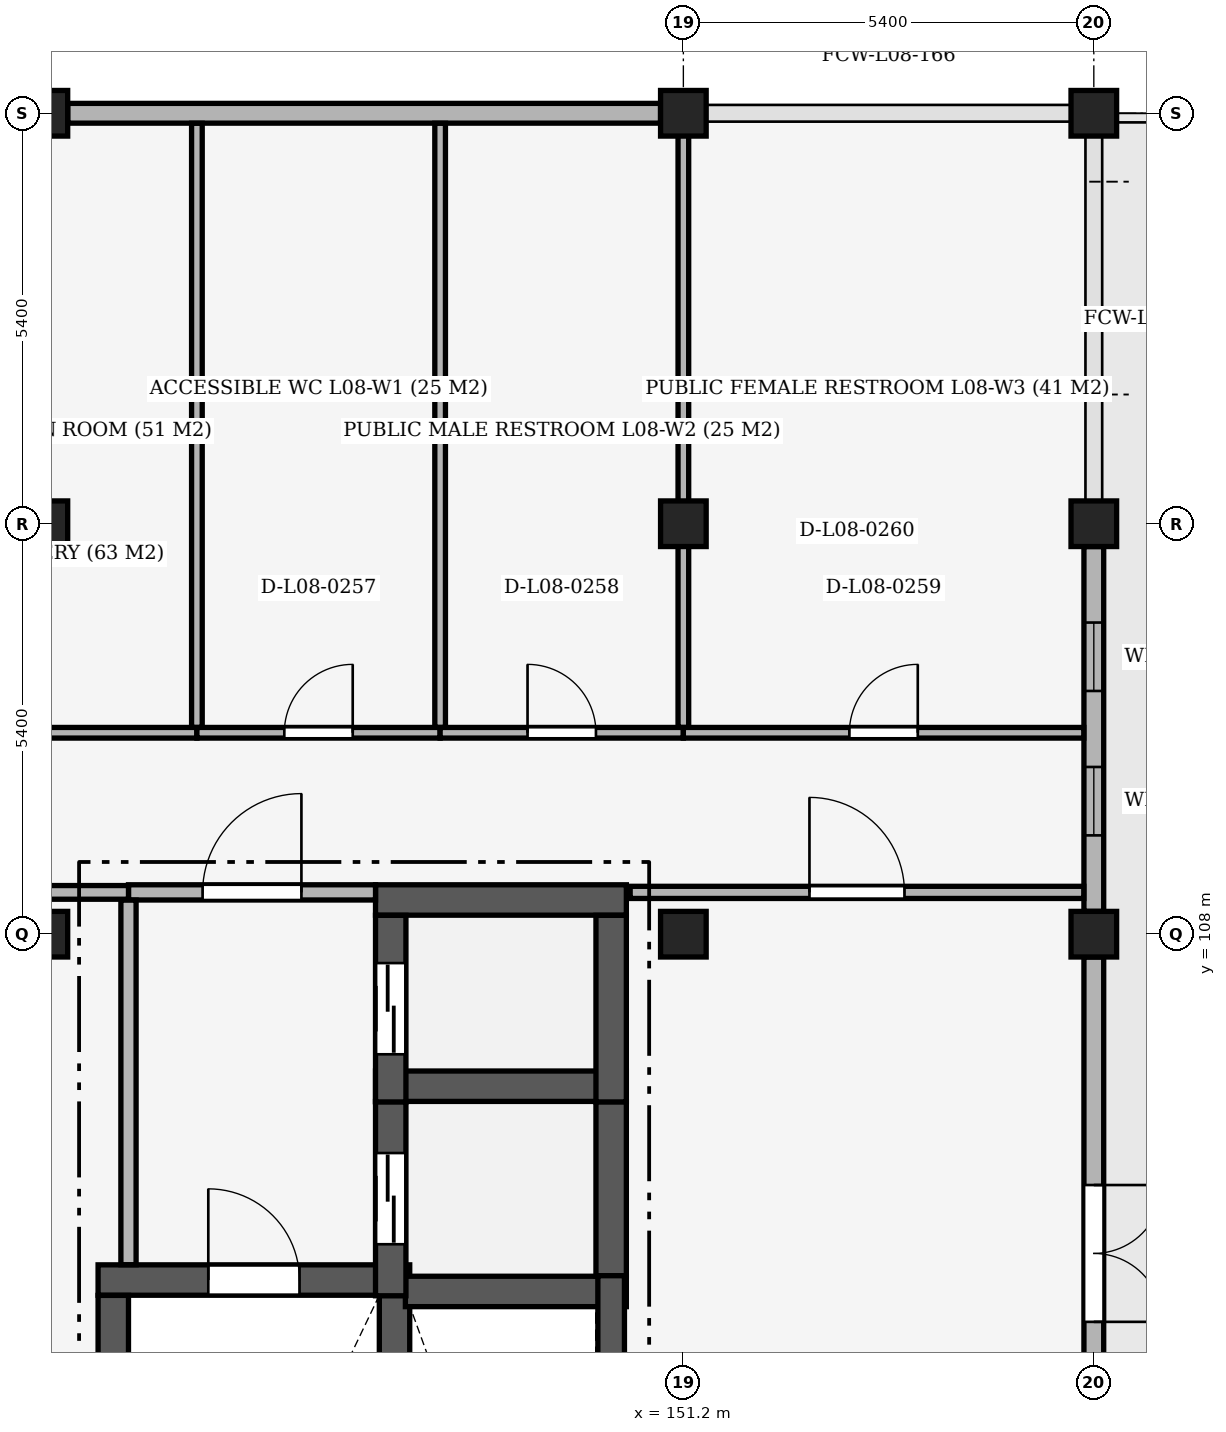
"""IFC4 building model, lengths in metres.
Left out: names, types, materials, properties, quantities, classifications, styles, units other than length and angle.
Written with IfcOpenShell. Run it as: python <this file> out.ifc"""

import sys

from ifc_helpers import new_model, si_unit, direction, frame, frame_2d, origin, origin_2d, place, context, subcontext, project, spatial, rectangle, extrude, element, fill, save


model = new_model("IFC4")
c1 = context("Model", 3, precision=1e-05, world=origin(), true_north=direction((0.0, 1.0)))
c2 = subcontext(c1, "Body", "Model", "MODEL_VIEW")
j1 = project(units=[si_unit("LENGTHUNIT", "METRE"), si_unit("PLANEANGLEUNIT", "RADIAN")], contexts=[c1])
p1 = place(None, origin())
s1 = spatial("IfcSite", under=j1, at=p1, CompositionType="ELEMENT")
p2 = place(p1, origin())
s2 = spatial("IfcBuilding", under=s1, at=p2, CompositionType="ELEMENT")
p3 = place(p2, frame((0.0, 0.0, 37.8)))
s3 = spatial("IfcBuildingStorey", under=s2, at=p3, CompositionType="ELEMENT", Elevation=37.8)
for number, where, z_axis, x_axis in (
    (1, (142.8, 108.0, 0.0), (0.0, 0.0, 1.0), (1.0, 0.0, 0.0)),
    (2, (142.8, 113.4, 0.0), (0.0, 0.0, 1.0), (1.0, 0.0, 0.0)),
    (3, (142.8, 118.8, 0.0), (0.0, 0.0, 1.0), (1.0, 0.0, 0.0)),
    (4, (151.2, 108.0, 0.0), (0.0, 0.0, 1.0), (1.0, 0.0, 0.0)),
    (5, (151.2, 113.4, 0.0), (0.0, 0.0, 1.0), (1.0, 0.0, 0.0)),
    (6, (151.2, 118.8, 0.0), (0.0, 0.0, 1.0), (1.0, 0.0, 0.0)),
    (7, (156.6, 108.0, 0.0), (0.0, 0.0, 1.0), (1.0, 0.0, 0.0)),
    (8, (156.6, 113.4, 0.0), (0.0, 0.0, 1.0), (1.0, 0.0, 0.0)),
    (9, (156.6, 118.8, 0.0), (0.0, 0.0, 1.0), (1.0, 0.0, 0.0)),
):
    element("IfcColumn", number, at=place(p3, frame(where, z_axis=z_axis, x_axis=x_axis)), inside=s3, PredefinedType="COLUMN", context=c2, shape_type="SweptSolid", body=[
        extrude(rectangle(XDim=0.6, YDim=0.6, at=origin_2d()), origin(), (0.0, 0.0, 1.0), 4.2),
    ])
p4 = place(p3, frame((143.1, 118.8, 0.0), z_axis=(0.0, 0.0, 1.0), x_axis=(1.0, 0.0, 0.0)))
e10 = element("IfcWall", 10, at=p4, inside=s3, PredefinedType="SOLIDWALL", context=c2, shape_type="SweptSolid", body=[
    extrude(rectangle(XDim=7.8, YDim=0.26, at=frame_2d((3.9, 0.0))), origin(), (0.0, 0.0, 1.0), 3.26),
])
p5 = place(p3, frame((156.6, 113.1, 0.0), z_axis=(0.0, 0.0, 1.0), x_axis=(0.0, -1.0, 0.0)))
e11 = element("IfcWall", 11, at=p5, inside=s3, PredefinedType="SOLIDWALL", context=c2, shape_type="SweptSolid", body=[
    extrude(rectangle(XDim=4.8, YDim=0.26, at=frame_2d((2.4, 0.0))), origin(), (0.0, 0.0, 1.0), 3.41),
])
p6 = place(p5, frame((1.0, 0.0, 0.9)))
e12 = element("IfcOpeningElement", 12, at=p6, cuts=e11, PredefinedType="OPENING", context=c2, shape_type="SweptSolid", body=[
    extrude(rectangle(XDim=0.9, YDim=2.2, at=frame_2d((0.45, 1.1))), frame((0.0, 0.145, 0.0), z_axis=(0.0, -1.0, 0.0), x_axis=(1.0, 0.0, 0.0)), (0.0, 0.0, 1.0), 0.29),
])
p7 = place(p5, frame((2.9, 0.0, 0.9)))
e13 = element("IfcOpeningElement", 13, at=p7, cuts=e11, PredefinedType="OPENING", context=c2, shape_type="SweptSolid", body=[
    extrude(rectangle(XDim=0.9, YDim=2.2, at=frame_2d((0.45, 1.1))), frame((0.0, 0.145, 0.0), z_axis=(0.0, -1.0, 0.0), x_axis=(1.0, 0.0, 0.0)), (0.0, 0.0, 1.0), 0.29),
])
p8 = place(p3, frame((156.6, 107.7, 0.0), z_axis=(0.0, 0.0, 1.0), x_axis=(0.0, -1.0, 0.0)))
e14 = element("IfcWall", 14, at=p8, inside=s3, PredefinedType="SOLIDWALL", context=c2, shape_type="SweptSolid", body=[
    extrude(rectangle(XDim=7.8, YDim=0.26, at=frame_2d((3.9, 0.0))), origin(), (0.0, 0.0, 1.0), 3.26),
])
p9 = place(p8, frame((3.0, 0.0, 0.0)))
e15 = element("IfcOpeningElement", 15, at=p9, cuts=e14, PredefinedType="OPENING", context=c2, shape_type="SweptSolid", body=[
    extrude(rectangle(XDim=1.8, YDim=2.2, at=frame_2d((0.9, 1.1))), frame((0.0, 0.145, 0.0), z_axis=(0.0, -1.0, 0.0), x_axis=(1.0, 0.0, 0.0)), (0.0, 0.0, 1.0), 0.29),
])
p10 = place(p3, frame((143.5, 103.45, 0.0), z_axis=(0.0, 0.0, 1.0), x_axis=(1.0, 0.0, 0.0)))
e16 = element("IfcWall", 16, at=p10, inside=s3, PredefinedType="SHEAR", context=c2, shape_type="SweptSolid", body=[
    extrude(rectangle(XDim=4.1, YDim=0.4, at=frame_2d((2.05, 0.0))), origin(), (0.0, 0.0, 1.0), 3.96),
])
p11 = place(p10, frame((1.45, 0.0, 0.0)))
e17 = element("IfcOpeningElement", 17, at=p11, cuts=e16, PredefinedType="OPENING", context=c2, shape_type="SweptSolid", body=[
    extrude(rectangle(XDim=1.2, YDim=2.2, at=frame_2d((0.6, 1.1))), frame((0.0, 0.215, 0.0), z_axis=(0.0, -1.0, 0.0), x_axis=(1.0, 0.0, 0.0)), (0.0, 0.0, 1.0), 0.43),
])
for number, where, z_axis, x_axis in (
    (18, (143.7, 96.352, 0.0), (0.0, 0.0, 1.0), (0.0, 1.0, 0.0)),
    (19, (147.4, 96.352, 0.0), (0.0, 0.0, 1.0), (0.0, 1.0, 0.0)),
):
    element("IfcWall", number, at=place(p3, frame(where, z_axis=z_axis, x_axis=x_axis)), inside=s3, PredefinedType="SHEAR", context=c2, shape_type="SweptSolid", body=[
        extrude(rectangle(XDim=6.896, YDim=0.4, at=frame_2d((3.448, 0.0))), origin(), (0.0, 0.0, 1.0), 3.96),
    ])
p12 = place(p3, frame((147.543, 103.3, 0.0), z_axis=(0.0, 0.0, 1.0), x_axis=(1.0, 0.0, 0.0)))
e20 = element("IfcWall", 20, at=p12, inside=s3, PredefinedType="SHEAR", context=c2, shape_type="SweptSolid", body=[
    extrude(rectangle(XDim=2.907, YDim=0.4, at=frame_2d((1.454, 0.0))), origin(), (0.0, 0.0, 1.0), 3.96),
])
p13 = place(p3, frame((147.15, 106.0, 0.0), z_axis=(0.0, 0.0, 1.0), x_axis=(1.0, 0.0, 0.0)))
e21 = element("IfcWall", 21, at=p13, inside=s3, PredefinedType="SHEAR", context=c2, shape_type="SweptSolid", body=[
    extrude(rectangle(XDim=3.3, YDim=0.4, at=frame_2d((1.65, 0.0))), origin(), (0.0, 0.0, 1.0), 3.96),
])
p14 = place(p3, frame((147.35, 103.243, 0.0), z_axis=(0.0, 0.0, 1.0), x_axis=(0.0, 1.0, 0.0)))
e22 = element("IfcWall", 22, at=p14, inside=s3, PredefinedType="SHEAR", context=c2, shape_type="SweptSolid", body=[
    extrude(rectangle(XDim=2.555, YDim=0.4, at=frame_2d((1.278, 0.0))), origin(), (0.0, 0.0, 1.0), 3.96),
])
p15 = place(p14, frame((0.678, 0.0, 0.0)))
e23 = element("IfcOpeningElement", 23, at=p15, cuts=e22, PredefinedType="OPENING", context=c2, shape_type="SweptSolid", body=[
    extrude(rectangle(XDim=1.2, YDim=2.15, at=frame_2d((0.6, 1.075))), frame((0.0, 0.215, 0.0), z_axis=(0.0, -1.0, 0.0), x_axis=(1.0, 0.0, 0.0)), (0.0, 0.0, 1.0), 0.43),
])
p16 = place(p3, frame((150.25, 103.502, 0.0), z_axis=(0.0, 0.0, 1.0), x_axis=(0.0, 1.0, 0.0)))
e24 = element("IfcWall", 24, at=p16, inside=s3, PredefinedType="SHEAR", context=c2, shape_type="SweptSolid", body=[
    extrude(rectangle(XDim=2.296, YDim=0.4, at=frame_2d((1.148, 0.0))), origin(), (0.0, 0.0, 1.0), 3.96),
])
p17 = place(p3, frame((147.15, 108.45, 0.0), z_axis=(0.0, 0.0, 1.0), x_axis=(1.0, 0.0, 0.0)))
e25 = element("IfcWall", 25, at=p17, inside=s3, PredefinedType="SHEAR", context=c2, shape_type="SweptSolid", body=[
    extrude(rectangle(XDim=3.3, YDim=0.4, at=frame_2d((1.65, 0.0))), origin(), (0.0, 0.0, 1.0), 3.96),
])
p18 = place(p3, frame((147.35, 105.793, 0.0), z_axis=(0.0, 0.0, 1.0), x_axis=(0.0, 1.0, 0.0)))
e26 = element("IfcWall", 26, at=p18, inside=s3, PredefinedType="SHEAR", context=c2, shape_type="SweptSolid", body=[
    extrude(rectangle(XDim=2.455, YDim=0.4, at=frame_2d((1.228, 0.0))), origin(), (0.0, 0.0, 1.0), 3.96),
])
p19 = place(p18, frame((0.627, 0.0, 0.0)))
e27 = element("IfcOpeningElement", 27, at=p19, cuts=e26, PredefinedType="OPENING", context=c2, shape_type="SweptSolid", body=[
    extrude(rectangle(XDim=1.2, YDim=2.15, at=frame_2d((0.6, 1.075))), frame((0.0, 0.215, 0.0), z_axis=(0.0, -1.0, 0.0), x_axis=(1.0, 0.0, 0.0)), (0.0, 0.0, 1.0), 0.43),
])
p20 = place(p3, frame((150.25, 105.793, 0.0), z_axis=(0.0, 0.0, 1.0), x_axis=(0.0, 1.0, 0.0)))
e28 = element("IfcWall", 28, at=p20, inside=s3, PredefinedType="SHEAR", context=c2, shape_type="SweptSolid", body=[
    extrude(rectangle(XDim=2.455, YDim=0.4, at=frame_2d((1.228, 0.0))), origin(), (0.0, 0.0, 1.0), 3.96),
])
p21 = place(p3, frame((150.25, 96.32, 0.0), z_axis=(0.0, 0.0, 1.0), x_axis=(0.0, 1.0, 0.0)))
e29 = element("IfcWall", 29, at=p21, inside=s3, PredefinedType="SHEAR", context=c2, shape_type="SweptSolid", body=[
    extrude(rectangle(XDim=7.187, YDim=0.35, at=frame_2d((3.594, 0.0))), origin(), (0.0, 0.0, 1.0), 3.96),
])
p22 = place(p3, frame((143.9, 108.55, 0.0), z_axis=(0.0, 0.0, 1.0), x_axis=(1.0, 0.0, 0.0)))
e30 = element("IfcWall", 30, at=p22, inside=s3, PredefinedType="PARTITIONING", context=c2, shape_type="SweptSolid", body=[
    extrude(rectangle(XDim=3.25, YDim=0.2, at=frame_2d((1.625, 0.0))), origin(), (0.0, 0.0, 1.0), 3.96),
])
p23 = place(p22, frame((0.975, 0.0, 0.0)))
e31 = element("IfcOpeningElement", 31, at=p23, cuts=e30, PredefinedType="OPENING", context=c2, shape_type="SweptSolid", body=[
    extrude(rectangle(XDim=1.3, YDim=2.2, at=frame_2d((0.65, 1.1))), frame((0.0, 0.115, 0.0), z_axis=(0.0, -1.0, 0.0), x_axis=(1.0, 0.0, 0.0)), (0.0, 0.0, 1.0), 0.23),
])
p24 = place(p3, frame((142.51, 108.55, 0.0), z_axis=(0.0, 0.0, 1.0), x_axis=(1.0, 0.0, 0.0)))
e32 = element("IfcWall", 32, at=p24, inside=s3, PredefinedType="PARTITIONING", context=c2, shape_type="SweptSolid", body=[
    extrude(rectangle(XDim=1.39, YDim=0.18, at=frame_2d((0.695, 0.0))), origin(), (0.0, 0.0, 1.0), 3.41),
])
p25 = place(p3, frame((150.5, 108.55, 0.0), z_axis=(0.0, 0.0, 1.0), x_axis=(1.0, 0.0, 0.0)))
e33 = element("IfcWall", 33, at=p25, inside=s3, PredefinedType="PARTITIONING", context=c2, shape_type="SweptSolid", body=[
    extrude(rectangle(XDim=5.968, YDim=0.16, at=frame_2d((2.984, 0.0))), origin(), (0.0, 0.0, 1.0), 3.41),
])
p26 = place(p25, frame((2.359, 0.0, 0.0)))
e34 = element("IfcOpeningElement", 34, at=p26, cuts=e33, PredefinedType="OPENING", context=c2, shape_type="SweptSolid", body=[
    extrude(rectangle(XDim=1.25, YDim=2.2, at=frame_2d((0.625, 1.1))), frame((0.0, 0.095, 0.0), z_axis=(0.0, -1.0, 0.0), x_axis=(1.0, 0.0, 0.0)), (0.0, 0.0, 1.0), 0.19),
])
p27 = place(p3, frame((138.4, 110.65, 0.0), z_axis=(0.0, 0.0, 1.0), x_axis=(1.0, 0.0, 0.0)))
e35 = element("IfcWall", 35, at=p27, inside=s3, PredefinedType="PARTITIONING", context=c2, shape_type="SweptSolid", body=[
    extrude(rectangle(XDim=6.4, YDim=0.14, at=frame_2d((3.2, 0.0))), origin(), (0.0, 0.0, 1.0), 3.41),
])
p28 = place(p27, frame((2.7, 0.0, 0.0)))
e36 = element("IfcOpeningElement", 36, at=p28, cuts=e35, PredefinedType="OPENING", context=c2, shape_type="SweptSolid", body=[
    extrude(rectangle(XDim=1.0, YDim=2.2, at=frame_2d((0.5, 1.1))), frame((0.0, 0.085, 0.0), z_axis=(0.0, -1.0, 0.0), x_axis=(1.0, 0.0, 0.0)), (0.0, 0.0, 1.0), 0.17),
])
p29 = place(p3, frame((144.8, 110.65, 0.0), z_axis=(0.0, 0.0, 1.0), x_axis=(1.0, 0.0, 0.0)))
e37 = element("IfcWall", 37, at=p29, inside=s3, PredefinedType="PARTITIONING", context=c2, shape_type="SweptSolid", body=[
    extrude(rectangle(XDim=3.2, YDim=0.14, at=frame_2d((1.6, 0.0))), origin(), (0.0, 0.0, 1.0), 3.96),
])
p30 = place(p29, frame((1.15, 0.0, 0.0)))
e38 = element("IfcOpeningElement", 38, at=p30, cuts=e37, PredefinedType="OPENING", context=c2, shape_type="SweptSolid", body=[
    extrude(rectangle(XDim=0.9, YDim=2.1, at=frame_2d((0.45, 1.05))), frame((0.0, 0.085, 0.0), z_axis=(0.0, -1.0, 0.0), x_axis=(1.0, 0.0, 0.0)), (0.0, 0.0, 1.0), 0.17),
])
p31 = place(p3, frame((148.0, 110.65, 0.0), z_axis=(0.0, 0.0, 1.0), x_axis=(1.0, 0.0, 0.0)))
e39 = element("IfcWall", 39, at=p31, inside=s3, PredefinedType="PARTITIONING", context=c2, shape_type="SweptSolid", body=[
    extrude(rectangle(XDim=3.2, YDim=0.14, at=frame_2d((1.6, 0.0))), origin(), (0.0, 0.0, 1.0), 3.41),
])
p32 = place(p31, frame((1.15, 0.0, 0.0)))
e40 = element("IfcOpeningElement", 40, at=p32, cuts=e39, PredefinedType="OPENING", context=c2, shape_type="SweptSolid", body=[
    extrude(rectangle(XDim=0.9, YDim=2.1, at=frame_2d((0.45, 1.05))), frame((0.0, 0.085, 0.0), z_axis=(0.0, -1.0, 0.0), x_axis=(1.0, 0.0, 0.0)), (0.0, 0.0, 1.0), 0.17),
])
p33 = place(p3, frame((151.2, 110.65, 0.0), z_axis=(0.0, 0.0, 1.0), x_axis=(1.0, 0.0, 0.0)))
e41 = element("IfcWall", 41, at=p33, inside=s3, PredefinedType="PARTITIONING", context=c2, shape_type="SweptSolid", body=[
    extrude(rectangle(XDim=5.268, YDim=0.14, at=frame_2d((2.634, 0.0))), origin(), (0.0, 0.0, 1.0), 3.41),
])
p34 = place(p33, frame((2.184, 0.0, 0.0)))
e42 = element("IfcOpeningElement", 42, at=p34, cuts=e41, PredefinedType="OPENING", context=c2, shape_type="SweptSolid", body=[
    extrude(rectangle(XDim=0.9, YDim=2.1, at=frame_2d((0.45, 1.05))), frame((0.0, 0.085, 0.0), z_axis=(0.0, -1.0, 0.0), x_axis=(1.0, 0.0, 0.0)), (0.0, 0.0, 1.0), 0.17),
])
p35 = place(p3, frame((143.9, 103.652, 0.0), z_axis=(0.0, 0.0, 1.0), x_axis=(0.0, 1.0, 0.0)))
e43 = element("IfcWall", 43, at=p35, inside=s3, PredefinedType="PARTITIONING", context=c2, shape_type="SweptSolid", body=[
    extrude(rectangle(XDim=4.796, YDim=0.2, at=frame_2d((2.398, 0.0))), origin(), (0.0, 0.0, 1.0), 3.96),
])
for number, where, z_axis, x_axis in (
    (44, (144.8, 110.722, 0.0), (0.0, 0.0, 1.0), (0.0, 1.0, 0.0)),
    (45, (148.0, 110.722, 0.0), (0.0, 0.0, 1.0), (0.0, 1.0, 0.0)),
):
    element("IfcWall", number, at=place(p3, frame(where, z_axis=z_axis, x_axis=x_axis)), inside=s3, PredefinedType="PARTITIONING", context=c2, shape_type="SweptSolid", body=[
        extrude(rectangle(XDim=7.946, YDim=0.14, at=frame_2d((3.973, 0.0))), origin(), (0.0, 0.0, 1.0), 3.26),
    ])
p36 = place(p3, frame((151.2, 110.722, 0.0), z_axis=(0.0, 0.0, 1.0), x_axis=(0.0, 1.0, 0.0)))
e46 = element("IfcWall", 46, at=p36, inside=s3, PredefinedType="PARTITIONING", context=c2, shape_type="SweptSolid", body=[
    extrude(rectangle(XDim=8.114, YDim=0.14, at=frame_2d((4.057, 0.0))), origin(), (0.0, 0.0, 1.0), 3.26),
])
p37 = place(p6, origin())
e47 = element("IfcWindow", 47, at=p37, inside=s3, PartitioningType="SINGLE_PANEL", PredefinedType="WINDOW", context=c2, shape_type="SweptSolid", body=[
    extrude(rectangle(XDim=0.9, YDim=2.2, at=frame_2d((0.45, 1.1))), frame((0.0, 0.03, 0.0), z_axis=(0.0, -1.0, 0.0), x_axis=(1.0, 0.0, 0.0)), (0.0, 0.0, 1.0), 0.06),
])
fill(e12, e47)
p38 = place(p7, origin())
e48 = element("IfcWindow", 48, at=p38, inside=s3, PartitioningType="SINGLE_PANEL", PredefinedType="WINDOW", context=c2, shape_type="SweptSolid", body=[
    extrude(rectangle(XDim=0.9, YDim=2.2, at=frame_2d((0.45, 1.1))), frame((0.0, 0.03, 0.0), z_axis=(0.0, -1.0, 0.0), x_axis=(1.0, 0.0, 0.0)), (0.0, 0.0, 1.0), 0.06),
])
fill(e13, e48)
p39 = place(p9, origin())
e49 = element("IfcDoor", 49, at=p39, inside=s3, OperationType="DOUBLE_DOOR_SINGLE_SWING", PredefinedType="DOOR", context=c2, shape_type="SweptSolid", body=[
    extrude(rectangle(XDim=1.8, YDim=2.2, at=frame_2d((0.9, 1.1))), frame((0.0, 0.025, 0.0), z_axis=(0.0, -1.0, 0.0), x_axis=(1.0, 0.0, 0.0)), (0.0, 0.0, 1.0), 0.05),
])
fill(e15, e49)
p40 = place(p11, origin())
e50 = element("IfcDoor", 50, at=p40, inside=s3, OperationType="SINGLE_SWING_LEFT", PredefinedType="DOOR", context=c2, shape_type="SweptSolid", body=[
    extrude(rectangle(XDim=1.2, YDim=2.2, at=frame_2d((0.6, 1.1))), frame((0.0, 0.025, 0.0), z_axis=(0.0, -1.0, 0.0), x_axis=(1.0, 0.0, 0.0)), (0.0, 0.0, 1.0), 0.05),
])
fill(e17, e50)
p41 = place(p15, origin())
e51 = element("IfcDoor", 51, at=p41, inside=s3, OperationType="DOUBLE_DOOR_SLIDING", PredefinedType="DOOR", context=c2, shape_type="SweptSolid", body=[
    extrude(rectangle(XDim=1.2, YDim=2.15, at=frame_2d((0.6, 1.075))), frame((0.0, 0.025, 0.0), z_axis=(0.0, -1.0, 0.0), x_axis=(1.0, 0.0, 0.0)), (0.0, 0.0, 1.0), 0.05),
])
fill(e23, e51)
p42 = place(p19, origin())
e52 = element("IfcDoor", 52, at=p42, inside=s3, OperationType="DOUBLE_DOOR_SLIDING", PredefinedType="DOOR", context=c2, shape_type="SweptSolid", body=[
    extrude(rectangle(XDim=1.2, YDim=2.15, at=frame_2d((0.6, 1.075))), frame((0.0, 0.025, 0.0), z_axis=(0.0, -1.0, 0.0), x_axis=(1.0, 0.0, 0.0)), (0.0, 0.0, 1.0), 0.05),
])
fill(e27, e52)
p43 = place(p23, origin())
e53 = element("IfcDoor", 53, at=p43, inside=s3, OperationType="SINGLE_SWING_RIGHT", PredefinedType="DOOR", context=c2, shape_type="SweptSolid", body=[
    extrude(rectangle(XDim=1.3, YDim=2.2, at=frame_2d((0.65, 1.1))), frame((0.0, 0.025, 0.0), z_axis=(0.0, -1.0, 0.0), x_axis=(1.0, 0.0, 0.0)), (0.0, 0.0, 1.0), 0.05),
])
fill(e31, e53)
p44 = place(p30, origin())
e54 = element("IfcDoor", 54, at=p44, inside=s3, OperationType="SINGLE_SWING_RIGHT", PredefinedType="DOOR", context=c2, shape_type="SweptSolid", body=[
    extrude(rectangle(XDim=0.9, YDim=2.1, at=frame_2d((0.45, 1.05))), frame((0.0, 0.025, 0.0), z_axis=(0.0, -1.0, 0.0), x_axis=(1.0, 0.0, 0.0)), (0.0, 0.0, 1.0), 0.05),
])
fill(e38, e54)
p45 = place(p32, origin())
e55 = element("IfcDoor", 55, at=p45, inside=s3, OperationType="SINGLE_SWING_LEFT", PredefinedType="DOOR", context=c2, shape_type="SweptSolid", body=[
    extrude(rectangle(XDim=0.9, YDim=2.1, at=frame_2d((0.45, 1.05))), frame((0.0, 0.025, 0.0), z_axis=(0.0, -1.0, 0.0), x_axis=(1.0, 0.0, 0.0)), (0.0, 0.0, 1.0), 0.05),
])
fill(e40, e55)
p46 = place(p34, origin())
e56 = element("IfcDoor", 56, at=p46, inside=s3, OperationType="SINGLE_SWING_RIGHT", PredefinedType="DOOR", context=c2, shape_type="SweptSolid", body=[
    extrude(rectangle(XDim=0.9, YDim=2.1, at=frame_2d((0.45, 1.05))), frame((0.0, 0.025, 0.0), z_axis=(0.0, -1.0, 0.0), x_axis=(1.0, 0.0, 0.0)), (0.0, 0.0, 1.0), 0.05),
])
fill(e42, e56)
p47 = place(p26, origin())
e57 = element("IfcDoor", 57, at=p47, inside=s3, OperationType="SINGLE_SWING_LEFT", PredefinedType="DOOR", context=c2, shape_type="SweptSolid", body=[
    extrude(rectangle(XDim=1.25, YDim=2.2, at=frame_2d((0.625, 1.1))), frame((0.0, 0.025, 0.0), z_axis=(0.0, -1.0, 0.0), x_axis=(1.0, 0.0, 0.0)), (0.0, 0.0, 1.0), 0.05),
])
fill(e34, e57)
save(model, sys.argv[1])
